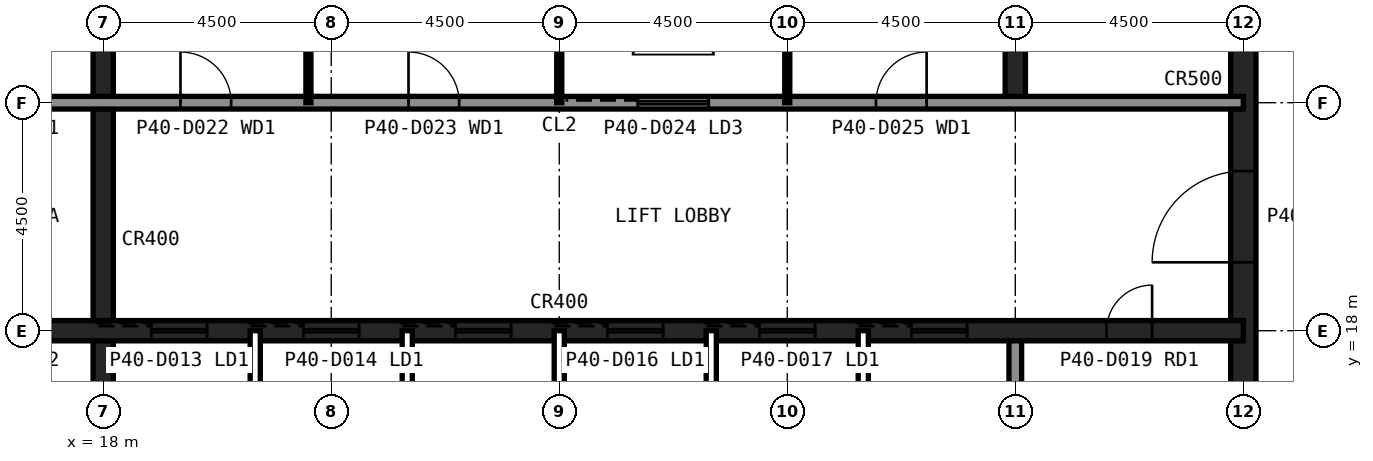
"""IFC4 building model, lengths in metres.
Left out: names, types, materials, properties, quantities, classifications, styles, units other than length and angle.
Written with IfcOpenShell. Run it as: python <this file> out.ifc"""

import sys

from ifc_helpers import new_model, si_unit, direction, frame, frame_2d, origin, place, context, subcontext, project, spatial, rectangle, extrude, element, fill, save


model = new_model("IFC4")
c1 = context("Model", 3, precision=1e-05, world=origin(), true_north=direction((0.0, 1.0)))
c2 = subcontext(c1, "Body", "Model", "MODEL_VIEW")
j1 = project(units=[si_unit("LENGTHUNIT", "METRE"), si_unit("PLANEANGLEUNIT", "RADIAN")], contexts=[c1])
p1 = place(None, origin())
s1 = spatial("IfcSite", under=j1, at=p1, CompositionType="ELEMENT")
p2 = place(p1, origin())
s2 = spatial("IfcBuilding", under=s1, at=p2, CompositionType="ELEMENT")
p3 = place(p2, frame((0.0, 0.0, 167.6)))
s3 = spatial("IfcBuildingStorey", under=s2, at=p3, CompositionType="ELEMENT", Elevation=167.6)
p4 = place(p3, frame((40.5, 13.5, 0.0), z_axis=(0.0, 0.0, 1.0), x_axis=(0.0, 1.0, 0.0)))
e1 = element("IfcWall", 1, at=p4, inside=s3, PredefinedType="SHEAR", context=c2, shape_type="SweptSolid", body=[
    extrude(rectangle(XDim=27.0, YDim=0.5, at=frame_2d((13.5, 0.0))), origin(), (0.0, 0.0, 1.0), 4.0),
])
p5 = place(p4, frame((5.85, 0.0, 0.0)))
e2 = element("IfcOpeningElement", 2, at=p5, cuts=e1, PredefinedType="OPENING", context=c2, shape_type="SweptSolid", body=[
    extrude(rectangle(XDim=1.8, YDim=2.1, at=frame_2d((0.9, 1.05))), frame((0.0, 0.26, 0.0), z_axis=(0.0, -1.0, 0.0), x_axis=(1.0, 0.0, 0.0)), (0.0, 0.0, 1.0), 0.52),
])
p6 = place(p4, frame((19.65, 0.0, 0.0)))
e3 = element("IfcOpeningElement", 3, at=p6, cuts=e1, PredefinedType="OPENING", context=c2, shape_type="SweptSolid", body=[
    extrude(rectangle(XDim=1.2, YDim=2.1, at=frame_2d((0.6, 1.05))), frame((0.0, 0.26, 0.0), z_axis=(0.0, -1.0, 0.0), x_axis=(1.0, 0.0, 0.0)), (0.0, 0.0, 1.0), 0.52),
])
p7 = place(p3, frame((18.0, 13.5, 0.0), z_axis=(0.0, 0.0, 1.0), x_axis=(0.0, 1.0, 0.0)))
e4 = element("IfcWall", 4, at=p7, inside=s3, PredefinedType="SHEAR", context=c2, shape_type="SweptSolid", body=[
    extrude(rectangle(XDim=18.0, YDim=0.4, at=frame_2d((9.0, 0.0))), origin(), (0.0, 0.0, 1.0), 4.0),
])
p8 = place(p3, frame((36.0, 13.5, 0.0), z_axis=(0.0, 0.0, 1.0), x_axis=(0.0, 1.0, 0.0)))
e5 = element("IfcWall", 5, at=p8, inside=s3, PredefinedType="SOLIDWALL", context=c2, shape_type="SweptSolid", body=[
    extrude(rectangle(XDim=4.5, YDim=0.25, at=frame_2d((2.25, 0.0))), origin(), (0.0, 0.0, 1.0), 3.84),
])
p9 = place(p3, frame((36.0, 22.5, 0.0), z_axis=(0.0, 0.0, 1.0), x_axis=(0.0, 1.0, 0.0)))
e6 = element("IfcWall", 6, at=p9, inside=s3, PredefinedType="SHEAR", context=c2, shape_type="SweptSolid", body=[
    extrude(rectangle(XDim=18.0, YDim=0.4, at=frame_2d((9.0, 0.0))), origin(), (0.0, 0.0, 1.0), 4.0),
])
p10 = place(p3, frame((13.5, 18.0, 0.0), z_axis=(0.0, 0.0, 1.0), x_axis=(1.0, 0.0, 0.0)))
e7 = element("IfcWall", 7, at=p10, inside=s3, PredefinedType="SHEAR", context=c2, shape_type="SweptSolid", body=[
    extrude(rectangle(XDim=27.0, YDim=0.4, at=frame_2d((13.5, 0.0))), origin(), (0.0, 0.0, 1.0), 4.0),
])
p11 = place(p10, frame((24.3, 0.0, 0.0)))
e8 = element("IfcOpeningElement", 8, at=p11, cuts=e7, PredefinedType="OPENING", context=c2, shape_type="SweptSolid", body=[
    extrude(rectangle(XDim=0.9, YDim=2.1, at=frame_2d((0.45, 1.05))), frame((0.0, 0.21, 0.0), z_axis=(0.0, -1.0, 0.0), x_axis=(1.0, 0.0, 0.0)), (0.0, 0.0, 1.0), 0.42),
])
p12 = place(p10, frame((5.45, 0.0, 0.0)))
e9 = element("IfcOpeningElement", 9, at=p12, cuts=e7, PredefinedType="OPENING", context=c2, shape_type="SweptSolid", body=[
    extrude(rectangle(XDim=1.1, YDim=2.1, at=frame_2d((0.55, 1.05))), frame((0.0, 0.21, 0.0), z_axis=(0.0, -1.0, 0.0), x_axis=(1.0, 0.0, 0.0)), (0.0, 0.0, 1.0), 0.42),
])
p13 = place(p10, frame((8.45, 0.0, 0.0)))
e10 = element("IfcOpeningElement", 10, at=p13, cuts=e7, PredefinedType="OPENING", context=c2, shape_type="SweptSolid", body=[
    extrude(rectangle(XDim=1.1, YDim=2.1, at=frame_2d((0.55, 1.05))), frame((0.0, 0.21, 0.0), z_axis=(0.0, -1.0, 0.0), x_axis=(1.0, 0.0, 0.0)), (0.0, 0.0, 1.0), 0.42),
])
p14 = place(p10, frame((11.45, 0.0, 0.0)))
e11 = element("IfcOpeningElement", 11, at=p14, cuts=e7, PredefinedType="OPENING", context=c2, shape_type="SweptSolid", body=[
    extrude(rectangle(XDim=1.1, YDim=2.1, at=frame_2d((0.55, 1.05))), frame((0.0, 0.21, 0.0), z_axis=(0.0, -1.0, 0.0), x_axis=(1.0, 0.0, 0.0)), (0.0, 0.0, 1.0), 0.42),
])
p15 = place(p10, frame((14.45, 0.0, 0.0)))
e12 = element("IfcOpeningElement", 12, at=p15, cuts=e7, PredefinedType="OPENING", context=c2, shape_type="SweptSolid", body=[
    extrude(rectangle(XDim=1.1, YDim=2.1, at=frame_2d((0.55, 1.05))), frame((0.0, 0.21, 0.0), z_axis=(0.0, -1.0, 0.0), x_axis=(1.0, 0.0, 0.0)), (0.0, 0.0, 1.0), 0.42),
])
p16 = place(p10, frame((17.45, 0.0, 0.0)))
e13 = element("IfcOpeningElement", 13, at=p16, cuts=e7, PredefinedType="OPENING", context=c2, shape_type="SweptSolid", body=[
    extrude(rectangle(XDim=1.1, YDim=2.1, at=frame_2d((0.55, 1.05))), frame((0.0, 0.21, 0.0), z_axis=(0.0, -1.0, 0.0), x_axis=(1.0, 0.0, 0.0)), (0.0, 0.0, 1.0), 0.42),
])
p17 = place(p10, frame((20.45, 0.0, 0.0)))
e14 = element("IfcOpeningElement", 14, at=p17, cuts=e7, PredefinedType="OPENING", context=c2, shape_type="SweptSolid", body=[
    extrude(rectangle(XDim=1.1, YDim=2.1, at=frame_2d((0.55, 1.05))), frame((0.0, 0.21, 0.0), z_axis=(0.0, -1.0, 0.0), x_axis=(1.0, 0.0, 0.0)), (0.0, 0.0, 1.0), 0.42),
])
p18 = place(p10, frame((1.6, 0.0, 0.0)))
e15 = element("IfcOpeningElement", 15, at=p18, cuts=e7, PredefinedType="OPENING", context=c2, shape_type="SweptSolid", body=[
    extrude(rectangle(XDim=1.3, YDim=2.2, at=frame_2d((0.65, 1.1))), frame((0.0, 0.21, 0.0), z_axis=(0.0, -1.0, 0.0), x_axis=(1.0, 0.0, 0.0)), (0.0, 0.0, 1.0), 0.42),
])
p19 = place(p3, frame((13.5, 22.5, 0.0), z_axis=(0.0, 0.0, 1.0), x_axis=(1.0, 0.0, 0.0)))
e16 = element("IfcWall", 16, at=p19, inside=s3, PredefinedType="SOLIDWALL", context=c2, shape_type="SweptSolid", body=[
    extrude(rectangle(XDim=27.0, YDim=0.25, at=frame_2d((13.5, 0.0))), origin(), (0.0, 0.0, 1.0), 3.84),
])
p20 = place(p19, frame((1.65, 0.0, 0.0)))
e17 = element("IfcOpeningElement", 17, at=p20, cuts=e16, PredefinedType="OPENING", context=c2, shape_type="SweptSolid", body=[
    extrude(rectangle(XDim=1.2, YDim=2.1, at=frame_2d((0.6, 1.05))), frame((0.0, 0.135, 0.0), z_axis=(0.0, -1.0, 0.0), x_axis=(1.0, 0.0, 0.0)), (0.0, 0.0, 1.0), 0.27),
])
p21 = place(p19, frame((6.025, 0.0, 0.0)))
e18 = element("IfcOpeningElement", 18, at=p21, cuts=e16, PredefinedType="OPENING", context=c2, shape_type="SweptSolid", body=[
    extrude(rectangle(XDim=1.0, YDim=2.1, at=frame_2d((0.5, 1.05))), frame((0.0, 0.135, 0.0), z_axis=(0.0, -1.0, 0.0), x_axis=(1.0, 0.0, 0.0)), (0.0, 0.0, 1.0), 0.27),
])
p22 = place(p19, frame((10.525, 0.0, 0.0)))
e19 = element("IfcOpeningElement", 19, at=p22, cuts=e16, PredefinedType="OPENING", context=c2, shape_type="SweptSolid", body=[
    extrude(rectangle(XDim=1.0, YDim=2.1, at=frame_2d((0.5, 1.05))), frame((0.0, 0.135, 0.0), z_axis=(0.0, -1.0, 0.0), x_axis=(1.0, 0.0, 0.0)), (0.0, 0.0, 1.0), 0.27),
])
p23 = place(p19, frame((19.75, 0.0, 0.0)))
e20 = element("IfcOpeningElement", 20, at=p23, cuts=e16, PredefinedType="OPENING", context=c2, shape_type="SweptSolid", body=[
    extrude(rectangle(XDim=1.0, YDim=2.1, at=frame_2d((0.5, 1.05))), frame((0.0, 0.135, 0.0), z_axis=(0.0, -1.0, 0.0), x_axis=(1.0, 0.0, 0.0)), (0.0, 0.0, 1.0), 0.27),
])
p24 = place(p19, frame((15.05, 0.0, 0.0)))
e21 = element("IfcOpeningElement", 21, at=p24, cuts=e16, PredefinedType="OPENING", context=c2, shape_type="SweptSolid", body=[
    extrude(rectangle(XDim=1.4, YDim=2.4, at=frame_2d((0.7, 1.2))), frame((0.0, 0.135, 0.0), z_axis=(0.0, -1.0, 0.0), x_axis=(1.0, 0.0, 0.0)), (0.0, 0.0, 1.0), 0.27),
])
for number, where, z_axis, x_axis in (
    (22, (21.0, 13.5, 0.0), (0.0, 0.0, 1.0), (0.0, 1.0, 0.0)),
    (23, (24.0, 13.5, 0.0), (0.0, 0.0, 1.0), (0.0, 1.0, 0.0)),
    (24, (27.0, 13.5, 0.0), (0.0, 0.0, 1.0), (0.0, 1.0, 0.0)),
    (25, (30.0, 13.5, 0.0), (0.0, 0.0, 1.0), (0.0, 1.0, 0.0)),
    (26, (33.0, 13.5, 0.0), (0.0, 0.0, 1.0), (0.0, 1.0, 0.0)),
):
    element("IfcWall", number, at=place(p3, frame(where, z_axis=z_axis, x_axis=x_axis)), inside=s3, PredefinedType="PARTITIONING", context=c2, shape_type="SweptSolid", body=[
        extrude(rectangle(XDim=4.5, YDim=0.2, at=frame_2d((2.25, 0.0))), origin(), (0.0, 0.0, 1.0), 3.84),
    ])
for number, where, z_axis, x_axis in (
    (27, (22.05, 22.5, 0.0), (0.0, 0.0, 1.0), (0.0, 1.0, 0.0)),
    (28, (27.0, 22.5, 0.0), (0.0, 0.0, 1.0), (0.0, 1.0, 0.0)),
    (29, (31.5, 22.5, 0.0), (0.0, 0.0, 1.0), (0.0, 1.0, 0.0)),
):
    element("IfcWall", number, at=place(p3, frame(where, z_axis=z_axis, x_axis=x_axis)), inside=s3, PredefinedType="PLUMBINGWALL", context=c2, shape_type="SweptSolid", body=[
        extrude(rectangle(XDim=9.0, YDim=0.1, at=frame_2d((4.5, 0.0))), origin(), (0.0, 0.0, 1.0), 3.84),
    ])
p25 = place(p5, origin())
e30 = element("IfcDoor", 30, at=p25, inside=s3, OperationType="SINGLE_SWING_LEFT", PredefinedType="DOOR", context=c2, shape_type="SweptSolid", body=[
    extrude(rectangle(XDim=1.8, YDim=2.1, at=frame_2d((0.9, 1.05))), frame((0.0, 0.025, 0.0), z_axis=(0.0, -1.0, 0.0), x_axis=(1.0, 0.0, 0.0)), (0.0, 0.0, 1.0), 0.05),
])
fill(e2, e30)
p26 = place(p21, origin())
e31 = element("IfcDoor", 31, at=p26, inside=s3, OperationType="SINGLE_SWING_LEFT", PredefinedType="DOOR", context=c2, shape_type="SweptSolid", body=[
    extrude(rectangle(XDim=1.0, YDim=2.1, at=frame_2d((0.5, 1.05))), frame((0.0, 0.025, 0.0), z_axis=(0.0, -1.0, 0.0), x_axis=(1.0, 0.0, 0.0)), (0.0, 0.0, 1.0), 0.05),
])
fill(e18, e31)
p27 = place(p22, origin())
e32 = element("IfcDoor", 32, at=p27, inside=s3, OperationType="SINGLE_SWING_LEFT", PredefinedType="DOOR", context=c2, shape_type="SweptSolid", body=[
    extrude(rectangle(XDim=1.0, YDim=2.1, at=frame_2d((0.5, 1.05))), frame((0.0, 0.025, 0.0), z_axis=(0.0, -1.0, 0.0), x_axis=(1.0, 0.0, 0.0)), (0.0, 0.0, 1.0), 0.05),
])
fill(e19, e32)
p28 = place(p23, origin())
e33 = element("IfcDoor", 33, at=p28, inside=s3, OperationType="SINGLE_SWING_RIGHT", PredefinedType="DOOR", context=c2, shape_type="SweptSolid", body=[
    extrude(rectangle(XDim=1.0, YDim=2.1, at=frame_2d((0.5, 1.05))), frame((0.0, 0.025, 0.0), z_axis=(0.0, -1.0, 0.0), x_axis=(1.0, 0.0, 0.0)), (0.0, 0.0, 1.0), 0.05),
])
fill(e20, e33)
p29 = place(p11, origin())
e34 = element("IfcDoor", 34, at=p29, inside=s3, OperationType="SINGLE_SWING_RIGHT", PredefinedType="DOOR", context=c2, shape_type="SweptSolid", body=[
    extrude(rectangle(XDim=0.9, YDim=2.1, at=frame_2d((0.45, 1.05))), frame((0.0, 0.025, 0.0), z_axis=(0.0, -1.0, 0.0), x_axis=(1.0, 0.0, 0.0)), (0.0, 0.0, 1.0), 0.05),
])
fill(e8, e34)
p30 = place(p12, origin())
e35 = element("IfcDoor", 35, at=p30, inside=s3, OperationType="SLIDING_TO_LEFT", PredefinedType="DOOR", context=c2, shape_type="SweptSolid", body=[
    extrude(rectangle(XDim=1.1, YDim=2.1, at=frame_2d((0.55, 1.05))), frame((0.0, 0.025, 0.0), z_axis=(0.0, -1.0, 0.0), x_axis=(1.0, 0.0, 0.0)), (0.0, 0.0, 1.0), 0.05),
])
fill(e9, e35)
p31 = place(p13, origin())
e36 = element("IfcDoor", 36, at=p31, inside=s3, OperationType="SLIDING_TO_LEFT", PredefinedType="DOOR", context=c2, shape_type="SweptSolid", body=[
    extrude(rectangle(XDim=1.1, YDim=2.1, at=frame_2d((0.55, 1.05))), frame((0.0, 0.025, 0.0), z_axis=(0.0, -1.0, 0.0), x_axis=(1.0, 0.0, 0.0)), (0.0, 0.0, 1.0), 0.05),
])
fill(e10, e36)
p32 = place(p14, origin())
e37 = element("IfcDoor", 37, at=p32, inside=s3, OperationType="SLIDING_TO_LEFT", PredefinedType="DOOR", context=c2, shape_type="SweptSolid", body=[
    extrude(rectangle(XDim=1.1, YDim=2.1, at=frame_2d((0.55, 1.05))), frame((0.0, 0.025, 0.0), z_axis=(0.0, -1.0, 0.0), x_axis=(1.0, 0.0, 0.0)), (0.0, 0.0, 1.0), 0.05),
])
fill(e11, e37)
p33 = place(p15, origin())
e38 = element("IfcDoor", 38, at=p33, inside=s3, OperationType="SLIDING_TO_LEFT", PredefinedType="DOOR", context=c2, shape_type="SweptSolid", body=[
    extrude(rectangle(XDim=1.1, YDim=2.1, at=frame_2d((0.55, 1.05))), frame((0.0, 0.025, 0.0), z_axis=(0.0, -1.0, 0.0), x_axis=(1.0, 0.0, 0.0)), (0.0, 0.0, 1.0), 0.05),
])
fill(e12, e38)
p34 = place(p16, origin())
e39 = element("IfcDoor", 39, at=p34, inside=s3, OperationType="SLIDING_TO_LEFT", PredefinedType="DOOR", context=c2, shape_type="SweptSolid", body=[
    extrude(rectangle(XDim=1.1, YDim=2.1, at=frame_2d((0.55, 1.05))), frame((0.0, 0.025, 0.0), z_axis=(0.0, -1.0, 0.0), x_axis=(1.0, 0.0, 0.0)), (0.0, 0.0, 1.0), 0.05),
])
fill(e13, e39)
p35 = place(p17, origin())
e40 = element("IfcDoor", 40, at=p35, inside=s3, OperationType="SLIDING_TO_LEFT", PredefinedType="DOOR", context=c2, shape_type="SweptSolid", body=[
    extrude(rectangle(XDim=1.1, YDim=2.1, at=frame_2d((0.55, 1.05))), frame((0.0, 0.025, 0.0), z_axis=(0.0, -1.0, 0.0), x_axis=(1.0, 0.0, 0.0)), (0.0, 0.0, 1.0), 0.05),
])
fill(e14, e40)
p36 = place(p24, origin())
e41 = element("IfcDoor", 41, at=p36, inside=s3, OperationType="SLIDING_TO_LEFT", PredefinedType="DOOR", context=c2, shape_type="SweptSolid", body=[
    extrude(rectangle(XDim=1.4, YDim=2.4, at=frame_2d((0.7, 1.2))), frame((0.0, 0.025, 0.0), z_axis=(0.0, -1.0, 0.0), x_axis=(1.0, 0.0, 0.0)), (0.0, 0.0, 1.0), 0.05),
])
fill(e21, e41)
save(model, sys.argv[1])
